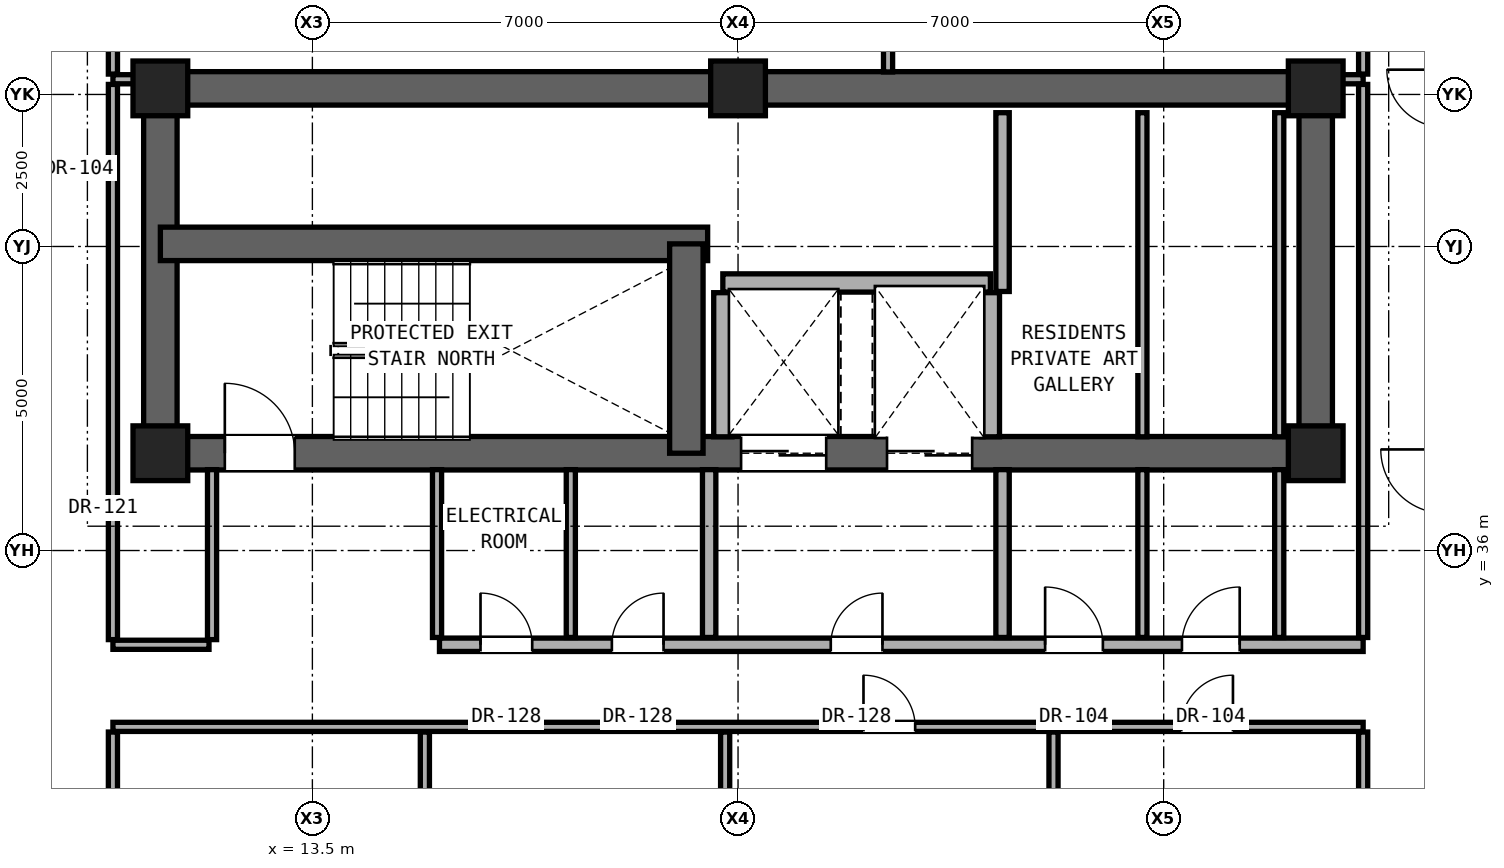
"""IFC4 building model, lengths in metres.
Left out: names, types, materials, properties, quantities, classifications, styles, units other than length and angle.
Written with IfcOpenShell. Run it as: python <this file> out.ifc"""

import sys

from ifc_helpers import new_model, si_unit, direction, frame, frame_2d, origin, origin_2d, place, context, subcontext, project, spatial, rectangle, extrude, element, fill, save


model = new_model("IFC4")
c1 = context("Model", 3, precision=1e-05, world=origin(), true_north=direction((0.0, 1.0)))
c2 = subcontext(c1, "Body", "Model", "MODEL_VIEW")
j1 = project(units=[si_unit("LENGTHUNIT", "METRE"), si_unit("PLANEANGLEUNIT", "RADIAN")], contexts=[c1])
p1 = place(None, origin())
s1 = spatial("IfcSite", under=j1, at=p1, CompositionType="ELEMENT")
p2 = place(p1, origin())
s2 = spatial("IfcBuilding", under=s1, at=p2, CompositionType="ELEMENT")
p3 = place(p2, frame((0.0, 0.0, 183.65)))
s3 = spatial("IfcBuildingStorey", under=s2, at=p3, CompositionType="ELEMENT", Elevation=183.65)
for number, where, z_axis, x_axis in (
    (1, (11.0, 37.6, 0.0), (0.0, 0.0, 1.0), (1.0, 0.0, 0.0)),
    (2, (30.0, 37.6, 0.0), (0.0, 0.0, 1.0), (1.0, 0.0, 0.0)),
    (3, (11.0, 43.6, 0.0), (0.0, 0.0, 1.0), (1.0, 0.0, 0.0)),
    (4, (20.5, 43.6, 0.0), (0.0, 0.0, 1.0), (1.0, 0.0, 0.0)),
    (5, (30.0, 43.6, 0.0), (0.0, 0.0, 1.0), (1.0, 0.0, 0.0)),
):
    element("IfcColumn", number, at=place(p3, frame(where, z_axis=z_axis, x_axis=x_axis)), inside=s3, PredefinedType="COLUMN", context=c2, shape_type="SweptSolid", body=[
        extrude(rectangle(XDim=0.9, YDim=0.9, at=origin_2d()), origin(), (0.0, 0.0, 1.0), 3.25),
    ])
p4 = place(p3, frame((11.0, 43.6, 0.0), z_axis=(0.0, 0.0, 1.0), x_axis=(1.0, 0.0, 0.0)))
e6 = element("IfcWall", 6, at=p4, inside=s3, PredefinedType="SHEAR", context=c2, shape_type="SweptSolid", body=[
    extrude(rectangle(XDim=19.0, YDim=0.55, at=frame_2d((9.5, 0.0))), origin(), (0.0, 0.0, 1.0), 3.05),
])
for number, where, z_axis, x_axis in (
    (7, (11.0, 37.6, 0.0), (0.0, 0.0, 1.0), (0.0, 1.0, 0.0)),
    (8, (30.0, 37.6, 0.0), (0.0, 0.0, 1.0), (0.0, 1.0, 0.0)),
):
    element("IfcWall", number, at=place(p3, frame(where, z_axis=z_axis, x_axis=x_axis)), inside=s3, PredefinedType="SHEAR", context=c2, shape_type="SweptSolid", body=[
        extrude(rectangle(XDim=6.0, YDim=0.55, at=frame_2d((3.0, 0.0))), origin(), (0.0, 0.0, 1.0), 3.05),
    ])
p5 = place(p3, frame((11.0, 37.6, 0.0), z_axis=(0.0, 0.0, 1.0), x_axis=(1.0, 0.0, 0.0)))
e9 = element("IfcWall", 9, at=p5, inside=s3, PredefinedType="SHEAR", context=c2, shape_type="SweptSolid", body=[
    extrude(rectangle(XDim=19.0, YDim=0.55, at=frame_2d((9.5, 0.0))), origin(), (0.0, 0.0, 1.0), 3.05),
])
p6 = place(p5, frame((1.06, 0.0, 0.0)))
e10 = element("IfcOpeningElement", 10, at=p6, cuts=e9, PredefinedType="OPENING", context=c2, shape_type="SweptSolid", body=[
    extrude(rectangle(XDim=1.15, YDim=2.2, at=frame_2d((0.575, 1.1))), frame((0.0, 0.285, 0.0), z_axis=(0.0, -1.0, 0.0), x_axis=(1.0, 0.0, 0.0)), (0.0, 0.0, 1.0), 0.57),
])
p7 = place(p5, frame((9.55, 0.0, 0.0)))
e11 = element("IfcOpeningElement", 11, at=p7, cuts=e9, PredefinedType="OPENING", context=c2, shape_type="SweptSolid", body=[
    extrude(rectangle(XDim=1.4, YDim=2.35, at=frame_2d((0.7, 1.175))), frame((0.0, 0.285, 0.0), z_axis=(0.0, -1.0, 0.0), x_axis=(1.0, 0.0, 0.0)), (0.0, 0.0, 1.0), 0.57),
])
p8 = place(p5, frame((11.95, 0.0, 0.0)))
e12 = element("IfcOpeningElement", 12, at=p8, cuts=e9, PredefinedType="OPENING", context=c2, shape_type="SweptSolid", body=[
    extrude(rectangle(XDim=1.4, YDim=2.35, at=frame_2d((0.7, 1.175))), frame((0.0, 0.285, 0.0), z_axis=(0.0, -1.0, 0.0), x_axis=(1.0, 0.0, 0.0)), (0.0, 0.0, 1.0), 0.57),
])
p9 = place(p3, frame((11.0, 41.043, 0.0), z_axis=(0.0, 0.0, 1.0), x_axis=(1.0, 0.0, 0.0)))
e13 = element("IfcWall", 13, at=p9, inside=s3, PredefinedType="SHEAR", context=c2, shape_type="SweptSolid", body=[
    extrude(rectangle(XDim=9.0, YDim=0.55, at=frame_2d((4.5, 0.0))), origin(), (0.0, 0.0, 1.0), 3.05),
])
p10 = place(p3, frame((19.65, 37.6, 0.0), z_axis=(0.0, 0.0, 1.0), x_axis=(0.0, 1.0, 0.0)))
e14 = element("IfcWall", 14, at=p10, inside=s3, PredefinedType="SHEAR", context=c2, shape_type="SweptSolid", body=[
    extrude(rectangle(XDim=3.443, YDim=0.55, at=frame_2d((1.721, 0.0))), origin(), (0.0, 0.0, 1.0), 3.05),
])
p11 = place(p3, frame((10.22, 33.1, 0.0), z_axis=(0.0, 0.0, 1.0), x_axis=(1.0, 0.0, 0.0)))
e15 = element("IfcWall", 15, at=p11, inside=s3, PredefinedType="PARTITIONING", context=c2, shape_type="SweptSolid", body=[
    extrude(rectangle(XDim=20.56, YDim=0.15, at=frame_2d((10.28, 0.0))), origin(), (0.0, 0.0, 1.0), 2.186),
])
p12 = place(p11, frame((12.343, 0.0, 0.0)))
e16 = element("IfcOpeningElement", 16, at=p12, cuts=e15, PredefinedType="OPENING", context=c2, shape_type="SweptSolid", body=[
    extrude(rectangle(XDim=0.85, YDim=2.01, at=frame_2d((0.425, 1.005))), frame((0.0, 0.085, 0.0), z_axis=(0.0, -1.0, 0.0), x_axis=(1.0, 0.0, 0.0)), (0.0, 0.0, 1.0), 0.17),
])
p13 = place(p11, frame((17.569, 0.0, 0.0)))
e17 = element("IfcOpeningElement", 17, at=p13, cuts=e15, PredefinedType="OPENING", context=c2, shape_type="SweptSolid", body=[
    extrude(rectangle(XDim=0.85, YDim=2.01, at=frame_2d((0.425, 1.005))), frame((0.0, 0.085, 0.0), z_axis=(0.0, -1.0, 0.0), x_axis=(1.0, 0.0, 0.0)), (0.0, 0.0, 1.0), 0.17),
])
p14 = place(p3, frame((10.22, 34.45, 0.0), z_axis=(0.0, 0.0, 1.0), x_axis=(1.0, 0.0, 0.0)))
e18 = element("IfcWall", 18, at=p14, inside=s3, PredefinedType="PARTITIONING", context=c2, shape_type="SweptSolid", body=[
    extrude(rectangle(XDim=1.58, YDim=0.15, at=frame_2d((0.79, 0.0))), origin(), (0.0, 0.0, 1.0), 2.186),
])
p15 = place(p3, frame((15.59, 34.45, 0.0), z_axis=(0.0, 0.0, 1.0), x_axis=(1.0, 0.0, 0.0)))
e19 = element("IfcWall", 19, at=p15, inside=s3, PredefinedType="SOLIDWALL", context=c2, shape_type="SweptSolid", body=[
    extrude(rectangle(XDim=15.19, YDim=0.22, at=frame_2d((7.595, 0.0))), origin(), (0.0, 0.0, 1.0), 2.186),
])
p16 = place(p15, frame((6.435, 0.0, 0.0)))
e20 = element("IfcOpeningElement", 20, at=p16, cuts=e19, PredefinedType="OPENING", context=c2, shape_type="SweptSolid", body=[
    extrude(rectangle(XDim=0.85, YDim=2.01, at=frame_2d((0.425, 1.005))), frame((0.0, 0.12, 0.0), z_axis=(0.0, -1.0, 0.0), x_axis=(1.0, 0.0, 0.0)), (0.0, 0.0, 1.0), 0.24),
])
p17 = place(p15, frame((9.96, 0.0, 0.0)))
e21 = element("IfcOpeningElement", 21, at=p17, cuts=e19, PredefinedType="OPENING", context=c2, shape_type="SweptSolid", body=[
    extrude(rectangle(XDim=0.95, YDim=2.15, at=frame_2d((0.475, 1.075))), frame((0.0, 0.12, 0.0), z_axis=(0.0, -1.0, 0.0), x_axis=(1.0, 0.0, 0.0)), (0.0, 0.0, 1.0), 0.24),
])
p18 = place(p15, frame((12.21, 0.0, 0.0)))
e22 = element("IfcOpeningElement", 22, at=p18, cuts=e19, PredefinedType="OPENING", context=c2, shape_type="SweptSolid", body=[
    extrude(rectangle(XDim=0.95, YDim=2.15, at=frame_2d((0.475, 1.075))), frame((0.0, 0.12, 0.0), z_axis=(0.0, -1.0, 0.0), x_axis=(1.0, 0.0, 0.0)), (0.0, 0.0, 1.0), 0.24),
])
p19 = place(p15, frame((0.675, 0.0, 0.0)))
e23 = element("IfcOpeningElement", 23, at=p19, cuts=e19, PredefinedType="OPENING", context=c2, shape_type="SweptSolid", body=[
    extrude(rectangle(XDim=0.85, YDim=2.01, at=frame_2d((0.425, 1.005))), frame((0.0, 0.12, 0.0), z_axis=(0.0, -1.0, 0.0), x_axis=(1.0, 0.0, 0.0)), (0.0, 0.0, 1.0), 0.24),
])
p20 = place(p15, frame((2.835, 0.0, 0.0)))
e24 = element("IfcOpeningElement", 24, at=p20, cuts=e19, PredefinedType="OPENING", context=c2, shape_type="SweptSolid", body=[
    extrude(rectangle(XDim=0.85, YDim=2.01, at=frame_2d((0.425, 1.005))), frame((0.0, 0.12, 0.0), z_axis=(0.0, -1.0, 0.0), x_axis=(1.0, 0.0, 0.0)), (0.0, 0.0, 1.0), 0.24),
])
p21 = place(p3, frame((20.25, 40.4, 0.0), z_axis=(0.0, 0.0, 1.0), x_axis=(1.0, 0.0, 0.0)))
e25 = element("IfcWall", 25, at=p21, inside=s3, PredefinedType="SOLIDWALL", context=c2, shape_type="SweptSolid", body=[
    extrude(rectangle(XDim=4.4, YDim=0.3, at=frame_2d((2.2, 0.0))), origin(), (0.0, 0.0, 1.0), 3.05),
])
for number, where, z_axis, x_axis in (
    (26, (10.22, 43.75, 0.0), (0.0, 0.0, 1.0), (1.0, 0.0, 0.0)),
    (27, (30.27, 43.75, 0.0), (0.0, 0.0, 1.0), (1.0, 0.0, 0.0)),
):
    element("IfcWall", number, at=place(p3, frame(where, z_axis=z_axis, x_axis=x_axis)), inside=s3, PredefinedType="PARTITIONING", context=c2, shape_type="SweptSolid", body=[
        extrude(rectangle(XDim=0.51, YDim=0.15, at=frame_2d((0.255, 0.0))), origin(), (0.0, 0.0, 1.0), 3.05),
    ])
p22 = place(p3, frame((10.22, 22.935, 0.0), z_axis=(0.0, 0.0, 1.0), x_axis=(0.0, 1.0, 0.0)))
e28 = element("IfcWall", 28, at=p22, inside=s3, PredefinedType="PARTITIONING", context=c2, shape_type="SweptSolid", body=[
    extrude(rectangle(XDim=10.08, YDim=0.15, at=frame_2d((5.04, 0.0))), origin(), (0.0, 0.0, 1.0), 2.346),
])
p23 = place(p22, frame((4.565, 0.0, 0.0)))
e29 = element("IfcOpeningElement", 29, at=p23, cuts=e28, PredefinedType="OPENING", context=c2, shape_type="SweptSolid", body=[
    extrude(rectangle(XDim=0.95, YDim=2.15, at=frame_2d((0.475, 1.075))), frame((0.0, 0.085, 0.0), z_axis=(0.0, -1.0, 0.0), x_axis=(1.0, 0.0, 0.0)), (0.0, 0.0, 1.0), 0.17),
])
p24 = place(p3, frame((10.22, 34.535, 0.0), z_axis=(0.0, 0.0, 1.0), x_axis=(0.0, 1.0, 0.0)))
e30 = element("IfcWall", 30, at=p24, inside=s3, PredefinedType="PARTITIONING", context=c2, shape_type="SweptSolid", body=[
    extrude(rectangle(XDim=9.13, YDim=0.15, at=frame_2d((4.565, 0.0))), origin(), (0.0, 0.0, 1.0), 2.442),
])
p25 = place(p3, frame((10.22, 43.835, 0.0), z_axis=(0.0, 0.0, 1.0), x_axis=(0.0, 1.0, 0.0)))
e31 = element("IfcWall", 31, at=p25, inside=s3, PredefinedType="PARTITIONING", context=c2, shape_type="SweptSolid", body=[
    extrude(rectangle(XDim=2.155, YDim=0.15, at=frame_2d((1.078, 0.0))), origin(), (0.0, 0.0, 1.0), 3.05),
])
p26 = place(p25, frame((0.552, 0.0, 0.0)))
e32 = element("IfcOpeningElement", 32, at=p26, cuts=e31, PredefinedType="OPENING", context=c2, shape_type="SweptSolid", body=[
    extrude(rectangle(XDim=1.05, YDim=2.2, at=frame_2d((0.525, 1.1))), frame((0.0, 0.085, 0.0), z_axis=(0.0, -1.0, 0.0), x_axis=(1.0, 0.0, 0.0)), (0.0, 0.0, 1.0), 0.17),
])
p27 = place(p3, frame((11.85, 34.535, 0.0), z_axis=(0.0, 0.0, 1.0), x_axis=(0.0, 1.0, 0.0)))
e33 = element("IfcWall", 33, at=p27, inside=s3, PredefinedType="PARTITIONING", context=c2, shape_type="SweptSolid", body=[
    extrude(rectangle(XDim=2.795, YDim=0.15, at=frame_2d((1.397, 0.0))), origin(), (0.0, 0.0, 1.0), 3.05),
])
p28 = place(p3, frame((15.35, 22.935, 0.0), z_axis=(0.0, 0.0, 1.0), x_axis=(0.0, 1.0, 0.0)))
e34 = element("IfcWall", 34, at=p28, inside=s3, PredefinedType="PARTITIONING", context=c2, shape_type="SweptSolid", body=[
    extrude(rectangle(XDim=10.08, YDim=0.15, at=frame_2d((5.04, 0.0))), origin(), (0.0, 0.0, 1.0), 2.186),
])
for number, where, z_axis, x_axis in (
    (35, (15.55, 34.57, 0.0), (0.0, 0.0, 1.0), (0.0, 1.0, 0.0)),
    (36, (17.75, 34.57, 0.0), (0.0, 0.0, 1.0), (0.0, 1.0, 0.0)),
):
    element("IfcWall", number, at=place(p3, frame(where, z_axis=z_axis, x_axis=x_axis)), inside=s3, PredefinedType="PARTITIONING", context=c2, shape_type="SweptSolid", body=[
        extrude(rectangle(XDim=2.76, YDim=0.15, at=frame_2d((1.38, 0.0))), origin(), (0.0, 0.0, 1.0), 3.05),
    ])
p29 = place(p3, frame((20.025, 34.57, 0.0), z_axis=(0.0, 0.0, 1.0), x_axis=(0.0, 1.0, 0.0)))
e37 = element("IfcWall", 37, at=p29, inside=s3, PredefinedType="SOLIDWALL", context=c2, shape_type="SweptSolid", body=[
    extrude(rectangle(XDim=2.76, YDim=0.22, at=frame_2d((1.38, 0.0))), origin(), (0.0, 0.0, 1.0), 3.05),
])
p30 = place(p3, frame((20.288, 19.985, 0.0), z_axis=(0.0, 0.0, 1.0), x_axis=(0.0, 1.0, 0.0)))
e38 = element("IfcWall", 38, at=p30, inside=s3, PredefinedType="PARTITIONING", context=c2, shape_type="SweptSolid", body=[
    extrude(rectangle(XDim=13.03, YDim=0.15, at=frame_2d((6.515, 0.0))), origin(), (0.0, 0.0, 1.0), 2.186),
])
p31 = place(p3, frame((20.25, 37.87, 0.0), z_axis=(0.0, 0.0, 1.0), x_axis=(0.0, 1.0, 0.0)))
e39 = element("IfcWall", 39, at=p31, inside=s3, PredefinedType="SOLIDWALL", context=c2, shape_type="SweptSolid", body=[
    extrude(rectangle(XDim=2.37, YDim=0.3, at=frame_2d((1.185, 0.0))), origin(), (0.0, 0.0, 1.0), 3.05),
])
p32 = place(p3, frame((22.967, 43.87, 0.0), z_axis=(0.0, 0.0, 1.0), x_axis=(0.0, 1.0, 0.0)))
e40 = element("IfcWall", 40, at=p32, inside=s3, PredefinedType="PARTITIONING", context=c2, shape_type="SweptSolid", body=[
    extrude(rectangle(XDim=2.12, YDim=0.15, at=frame_2d((1.06, 0.0))), origin(), (0.0, 0.0, 1.0), 3.05),
])
p33 = place(p3, frame((24.65, 37.87, 0.0), z_axis=(0.0, 0.0, 1.0), x_axis=(0.0, 1.0, 0.0)))
e41 = element("IfcWall", 41, at=p33, inside=s3, PredefinedType="SOLIDWALL", context=c2, shape_type="SweptSolid", body=[
    extrude(rectangle(XDim=2.37, YDim=0.3, at=frame_2d((1.185, 0.0))), origin(), (0.0, 0.0, 1.0), 3.05),
])
p34 = place(p3, frame((24.85, 34.57, 0.0), z_axis=(0.0, 0.0, 1.0), x_axis=(0.0, 1.0, 0.0)))
e42 = element("IfcWall", 42, at=p34, inside=s3, PredefinedType="SOLIDWALL", context=c2, shape_type="SweptSolid", body=[
    extrude(rectangle(XDim=2.76, YDim=0.22, at=frame_2d((1.38, 0.0))), origin(), (0.0, 0.0, 1.0), 3.05),
])
p35 = place(p3, frame((24.85, 40.26, 0.0), z_axis=(0.0, 0.0, 1.0), x_axis=(0.0, 1.0, 0.0)))
e43 = element("IfcWall", 43, at=p35, inside=s3, PredefinedType="SOLIDWALL", context=c2, shape_type="SweptSolid", body=[
    extrude(rectangle(XDim=2.94, YDim=0.22, at=frame_2d((1.47, 0.0))), origin(), (0.0, 0.0, 1.0), 3.05),
])
p36 = place(p3, frame((25.688, 19.985, 0.0), z_axis=(0.0, 0.0, 1.0), x_axis=(0.0, 1.0, 0.0)))
e44 = element("IfcWall", 44, at=p36, inside=s3, PredefinedType="PARTITIONING", context=c2, shape_type="SweptSolid", body=[
    extrude(rectangle(XDim=13.03, YDim=0.15, at=frame_2d((6.515, 0.0))), origin(), (0.0, 0.0, 1.0), 2.186),
])
p37 = place(p3, frame((27.15, 34.57, 0.0), z_axis=(0.0, 0.0, 1.0), x_axis=(0.0, 1.0, 0.0)))
e45 = element("IfcWall", 45, at=p37, inside=s3, PredefinedType="PARTITIONING", context=c2, shape_type="SweptSolid", body=[
    extrude(rectangle(XDim=2.76, YDim=0.15, at=frame_2d((1.38, 0.0))), origin(), (0.0, 0.0, 1.0), 3.05),
])
p38 = place(p3, frame((27.15, 37.87, 0.0), z_axis=(0.0, 0.0, 1.0), x_axis=(0.0, 1.0, 0.0)))
e46 = element("IfcWall", 46, at=p38, inside=s3, PredefinedType="PARTITIONING", context=c2, shape_type="SweptSolid", body=[
    extrude(rectangle(XDim=5.33, YDim=0.15, at=frame_2d((2.665, 0.0))), origin(), (0.0, 0.0, 1.0), 3.05),
])
p39 = place(p3, frame((29.4, 34.57, 0.0), z_axis=(0.0, 0.0, 1.0), x_axis=(0.0, 1.0, 0.0)))
e47 = element("IfcWall", 47, at=p39, inside=s3, PredefinedType="PARTITIONING", context=c2, shape_type="SweptSolid", body=[
    extrude(rectangle(XDim=2.76, YDim=0.15, at=frame_2d((1.38, 0.0))), origin(), (0.0, 0.0, 1.0), 3.05),
])
p40 = place(p3, frame((29.4, 37.87, 0.0), z_axis=(0.0, 0.0, 1.0), x_axis=(0.0, 1.0, 0.0)))
e48 = element("IfcWall", 48, at=p40, inside=s3, PredefinedType="PARTITIONING", context=c2, shape_type="SweptSolid", body=[
    extrude(rectangle(XDim=5.33, YDim=0.15, at=frame_2d((2.665, 0.0))), origin(), (0.0, 0.0, 1.0), 3.05),
])
p41 = place(p3, frame((30.78, 19.985, 0.0), z_axis=(0.0, 0.0, 1.0), x_axis=(0.0, 1.0, 0.0)))
e49 = element("IfcWall", 49, at=p41, inside=s3, PredefinedType="PARTITIONING", context=c2, shape_type="SweptSolid", body=[
    extrude(rectangle(XDim=13.03, YDim=0.15, at=frame_2d((6.515, 0.0))), origin(), (0.0, 0.0, 1.0), 2.346),
])
p42 = place(p3, frame((30.78, 34.57, 0.0), z_axis=(0.0, 0.0, 1.0), x_axis=(0.0, 1.0, 0.0)))
e50 = element("IfcWall", 50, at=p42, inside=s3, PredefinedType="PARTITIONING", context=c2, shape_type="SweptSolid", body=[
    extrude(rectangle(XDim=9.095, YDim=0.15, at=frame_2d((4.547, 0.0))), origin(), (0.0, 0.0, 1.0), 2.442),
])
p43 = place(p3, frame((30.78, 43.835, 0.0), z_axis=(0.0, 0.0, 1.0), x_axis=(0.0, 1.0, 0.0)))
e51 = element("IfcWall", 51, at=p43, inside=s3, PredefinedType="PARTITIONING", context=c2, shape_type="SweptSolid", body=[
    extrude(rectangle(XDim=2.155, YDim=0.15, at=frame_2d((1.078, 0.0))), origin(), (0.0, 0.0, 1.0), 3.05),
])
p44 = place(p43, frame((0.552, 0.0, 0.0)))
e52 = element("IfcOpeningElement", 52, at=p44, cuts=e51, PredefinedType="OPENING", context=c2, shape_type="SweptSolid", body=[
    extrude(rectangle(XDim=1.05, YDim=2.2, at=frame_2d((0.525, 1.1))), frame((0.0, 0.085, 0.0), z_axis=(0.0, -1.0, 0.0), x_axis=(1.0, 0.0, 0.0)), (0.0, 0.0, 1.0), 0.17),
])
p45 = place(p6, origin())
e53 = element("IfcDoor", 53, at=p45, inside=s3, OperationType="SINGLE_SWING_LEFT", PredefinedType="DOOR", context=c2, shape_type="SweptSolid", body=[
    extrude(rectangle(XDim=1.15, YDim=2.2, at=frame_2d((0.575, 1.1))), frame((0.0, 0.025, 0.0), z_axis=(0.0, -1.0, 0.0), x_axis=(1.0, 0.0, 0.0)), (0.0, 0.0, 1.0), 0.05),
])
fill(e10, e53)
p46 = place(p16, origin())
e54 = element("IfcDoor", 54, at=p46, inside=s3, OperationType="SINGLE_SWING_RIGHT", PredefinedType="DOOR", context=c2, shape_type="SweptSolid", body=[
    extrude(rectangle(XDim=0.85, YDim=2.01, at=frame_2d((0.425, 1.005))), frame((0.0, 0.025, 0.0), z_axis=(0.0, -1.0, 0.0), x_axis=(1.0, 0.0, 0.0)), (0.0, 0.0, 1.0), 0.05),
])
fill(e20, e54)
p47 = place(p17, origin())
e55 = element("IfcDoor", 55, at=p47, inside=s3, OperationType="SINGLE_SWING_LEFT", PredefinedType="DOOR", context=c2, shape_type="SweptSolid", body=[
    extrude(rectangle(XDim=0.95, YDim=2.15, at=frame_2d((0.475, 1.075))), frame((0.0, 0.025, 0.0), z_axis=(0.0, -1.0, 0.0), x_axis=(1.0, 0.0, 0.0)), (0.0, 0.0, 1.0), 0.05),
])
fill(e21, e55)
p48 = place(p18, origin())
e56 = element("IfcDoor", 56, at=p48, inside=s3, OperationType="SINGLE_SWING_RIGHT", PredefinedType="DOOR", context=c2, shape_type="SweptSolid", body=[
    extrude(rectangle(XDim=0.95, YDim=2.15, at=frame_2d((0.475, 1.075))), frame((0.0, 0.025, 0.0), z_axis=(0.0, -1.0, 0.0), x_axis=(1.0, 0.0, 0.0)), (0.0, 0.0, 1.0), 0.05),
])
fill(e22, e56)
p49 = place(p19, origin())
e57 = element("IfcDoor", 57, at=p49, inside=s3, OperationType="SINGLE_SWING_LEFT", PredefinedType="DOOR", context=c2, shape_type="SweptSolid", body=[
    extrude(rectangle(XDim=0.85, YDim=2.01, at=frame_2d((0.425, 1.005))), frame((0.0, 0.025, 0.0), z_axis=(0.0, -1.0, 0.0), x_axis=(1.0, 0.0, 0.0)), (0.0, 0.0, 1.0), 0.05),
])
fill(e23, e57)
p50 = place(p20, origin())
e58 = element("IfcDoor", 58, at=p50, inside=s3, OperationType="SINGLE_SWING_RIGHT", PredefinedType="DOOR", context=c2, shape_type="SweptSolid", body=[
    extrude(rectangle(XDim=0.85, YDim=2.01, at=frame_2d((0.425, 1.005))), frame((0.0, 0.025, 0.0), z_axis=(0.0, -1.0, 0.0), x_axis=(1.0, 0.0, 0.0)), (0.0, 0.0, 1.0), 0.05),
])
fill(e24, e58)
p51 = place(p12, origin())
e59 = element("IfcDoor", 59, at=p51, inside=s3, OperationType="SINGLE_SWING_LEFT", PredefinedType="DOOR", context=c2, shape_type="SweptSolid", body=[
    extrude(rectangle(XDim=0.85, YDim=2.01, at=frame_2d((0.425, 1.005))), frame((0.0, 0.025, 0.0), z_axis=(0.0, -1.0, 0.0), x_axis=(1.0, 0.0, 0.0)), (0.0, 0.0, 1.0), 0.05),
])
fill(e16, e59)
p52 = place(p13, origin())
e60 = element("IfcDoor", 60, at=p52, inside=s3, OperationType="SINGLE_SWING_RIGHT", PredefinedType="DOOR", context=c2, shape_type="SweptSolid", body=[
    extrude(rectangle(XDim=0.85, YDim=2.01, at=frame_2d((0.425, 1.005))), frame((0.0, 0.025, 0.0), z_axis=(0.0, -1.0, 0.0), x_axis=(1.0, 0.0, 0.0)), (0.0, 0.0, 1.0), 0.05),
])
fill(e17, e60)
p53 = place(p7, origin())
e61 = element("IfcDoor", 61, at=p53, inside=s3, OperationType="DOUBLE_DOOR_SLIDING", PredefinedType="DOOR", context=c2, shape_type="SweptSolid", body=[
    extrude(rectangle(XDim=1.4, YDim=2.35, at=frame_2d((0.7, 1.175))), frame((0.0, 0.025, 0.0), z_axis=(0.0, -1.0, 0.0), x_axis=(1.0, 0.0, 0.0)), (0.0, 0.0, 1.0), 0.05),
])
fill(e11, e61)
p54 = place(p8, origin())
e62 = element("IfcDoor", 62, at=p54, inside=s3, OperationType="DOUBLE_DOOR_SLIDING", PredefinedType="DOOR", context=c2, shape_type="SweptSolid", body=[
    extrude(rectangle(XDim=1.4, YDim=2.35, at=frame_2d((0.7, 1.175))), frame((0.0, 0.025, 0.0), z_axis=(0.0, -1.0, 0.0), x_axis=(1.0, 0.0, 0.0)), (0.0, 0.0, 1.0), 0.05),
])
fill(e12, e62)
save(model, sys.argv[1])
